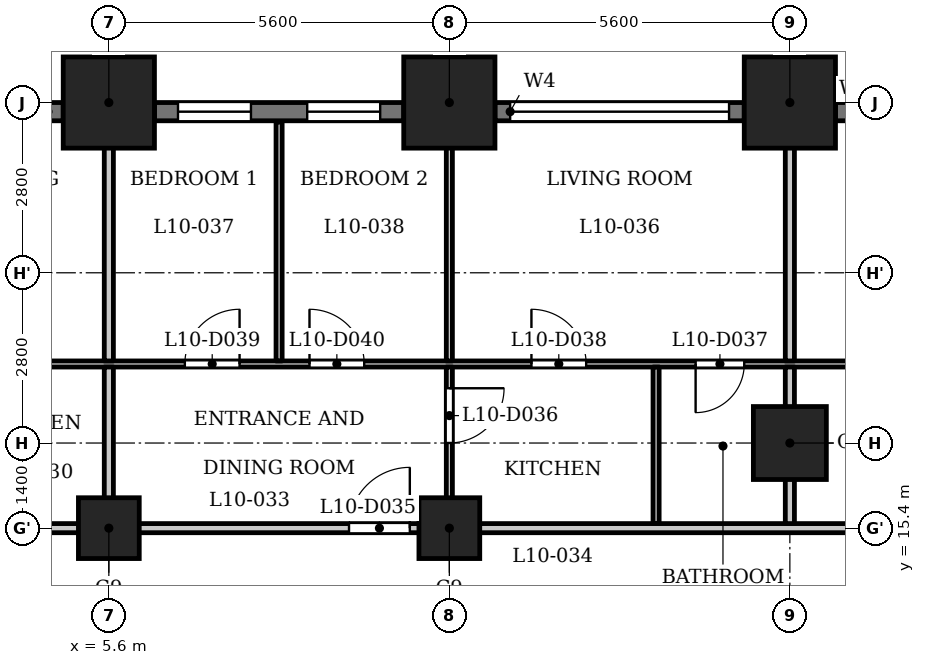
"""IFC4 building model, lengths in metres.
Left out: names, types, materials, properties, quantities, classifications, styles, units other than length and angle.
Written with IfcOpenShell. Run it as: python <this file> out.ifc"""

import sys

from ifc_helpers import new_model, si_unit, direction, frame, frame_2d, origin, origin_2d, place, context, subcontext, project, spatial, rectangle, extrude, element, fill, save


model = new_model("IFC4")
c1 = context("Model", 3, precision=1e-05, world=origin(), true_north=direction((0.0, 1.0)))
c2 = subcontext(c1, "Body", "Model", "MODEL_VIEW")
j1 = project(units=[si_unit("LENGTHUNIT", "METRE"), si_unit("PLANEANGLEUNIT", "RADIAN")], contexts=[c1])
p1 = place(None, origin())
s1 = spatial("IfcSite", under=j1, at=p1, CompositionType="ELEMENT")
p2 = place(p1, origin())
s2 = spatial("IfcBuilding", under=s1, at=p2, CompositionType="ELEMENT")
p3 = place(p2, frame((0.0, 0.0, 44.5)))
s3 = spatial("IfcBuildingStorey", under=s2, at=p3, CompositionType="ELEMENT", Elevation=44.5)
for number, where, z_axis, x_axis in (
    (1, (16.8, 22.4, 0.0), (0.0, 0.0, 1.0), (1.0, 0.0, 0.0)),
    (2, (11.2, 22.4, 0.0), (0.0, 0.0, 1.0), (1.0, 0.0, 0.0)),
    (3, (5.6, 22.4, 0.0), (0.0, 0.0, 1.0), (1.0, 0.0, 0.0)),
):
    element("IfcColumn", number, at=place(p3, frame(where, z_axis=z_axis, x_axis=x_axis)), inside=s3, PredefinedType="COLUMN", context=c2, shape_type="SweptSolid", body=[
        extrude(rectangle(XDim=1.5, YDim=1.5, at=origin_2d()), origin(), (0.0, 0.0, 1.0), 3.5),
    ])
p4 = place(p3, frame((16.8, 16.8, 0.0), z_axis=(0.0, 0.0, 1.0), x_axis=(1.0, 0.0, 0.0)))
e4 = element("IfcColumn", 4, at=p4, inside=s3, PredefinedType="COLUMN", context=c2, shape_type="SweptSolid", body=[
    extrude(rectangle(XDim=1.2, YDim=1.2, at=origin_2d()), origin(), (0.0, 0.0, 1.0), 3.5),
])
for number, where, z_axis, x_axis in (
    (5, (5.6, 15.4, 0.0), (0.0, 0.0, 1.0), (1.0, 0.0, 0.0)),
    (6, (11.2, 15.4, 0.0), (0.0, 0.0, 1.0), (1.0, 0.0, 0.0)),
):
    element("IfcColumn", number, at=place(p3, frame(where, z_axis=z_axis, x_axis=x_axis)), inside=s3, PredefinedType="COLUMN", context=c2, shape_type="SweptSolid", body=[
        extrude(rectangle(XDim=1.0, YDim=1.0, at=origin_2d()), origin(), (0.0, 0.0, 1.0), 3.5),
    ])
p5 = place(p3, frame((20.0, 22.25, 0.0), z_axis=(0.0, 0.0, 1.0), x_axis=(-1.0, 0.0, 0.0)))
e7 = element("IfcWall", 7, at=p5, inside=s3, PredefinedType="SOLIDWALL", context=c2, shape_type="SweptSolid", body=[
    extrude(rectangle(XDim=2.45, YDim=0.3, at=frame_2d((1.225, 0.0))), origin(), (0.0, 0.0, 1.0), 2.35),
])
p6 = place(p5, frame((0.325, 0.0, 0.9)))
e8 = element("IfcOpeningElement", 8, at=p6, cuts=e7, PredefinedType="OPENING", context=c2, shape_type="SweptSolid", body=[
    extrude(rectangle(XDim=1.8, YDim=1.25, at=frame_2d((0.9, 0.625))), frame((0.0, 0.16, 0.0), z_axis=(0.0, -1.0, 0.0), x_axis=(1.0, 0.0, 0.0)), (0.0, 0.0, 1.0), 0.32),
])
p7 = place(p3, frame((16.05, 22.25, 0.0), z_axis=(0.0, 0.0, 1.0), x_axis=(-1.0, 0.0, 0.0)))
e9 = element("IfcWall", 9, at=p7, inside=s3, PredefinedType="SOLIDWALL", context=c2, shape_type="SweptSolid", body=[
    extrude(rectangle(XDim=4.1, YDim=0.3, at=frame_2d((2.05, 0.0))), origin(), (0.0, 0.0, 1.0), 2.35),
])
p8 = place(p7, frame((0.25, 0.0, 1.2)))
e10 = element("IfcOpeningElement", 10, at=p8, cuts=e9, PredefinedType="OPENING", context=c2, shape_type="SweptSolid", body=[
    extrude(rectangle(XDim=3.6, YDim=0.95, at=frame_2d((1.8, 0.475))), frame((0.0, 0.16, 0.0), z_axis=(0.0, -1.0, 0.0), x_axis=(1.0, 0.0, 0.0)), (0.0, 0.0, 1.0), 0.32),
])
p9 = place(p3, frame((10.45, 22.25, 0.0), z_axis=(0.0, 0.0, 1.0), x_axis=(-1.0, 0.0, 0.0)))
e11 = element("IfcWall", 11, at=p9, inside=s3, PredefinedType="SOLIDWALL", context=c2, shape_type="SweptSolid", body=[
    extrude(rectangle(XDim=4.1, YDim=0.3, at=frame_2d((2.05, 0.0))), origin(), (0.0, 0.0, 1.0), 2.35),
])
p10 = place(p9, frame((0.387, 0.0, 0.6)))
e12 = element("IfcOpeningElement", 12, at=p10, cuts=e11, PredefinedType="OPENING", context=c2, shape_type="SweptSolid", body=[
    extrude(rectangle(XDim=1.2, YDim=1.55, at=frame_2d((0.6, 0.775))), frame((0.0, 0.16, 0.0), z_axis=(0.0, -1.0, 0.0), x_axis=(1.0, 0.0, 0.0)), (0.0, 0.0, 1.0), 0.32),
])
p11 = place(p9, frame((2.512, 0.0, 0.6)))
e13 = element("IfcOpeningElement", 13, at=p11, cuts=e11, PredefinedType="OPENING", context=c2, shape_type="SweptSolid", body=[
    extrude(rectangle(XDim=1.2, YDim=1.55, at=frame_2d((0.6, 0.775))), frame((0.0, 0.16, 0.0), z_axis=(0.0, -1.0, 0.0), x_axis=(1.0, 0.0, 0.0)), (0.0, 0.0, 1.0), 0.32),
])
p12 = place(p3, frame((4.85, 22.25, 0.0), z_axis=(0.0, 0.0, 1.0), x_axis=(-1.0, 0.0, 0.0)))
e14 = element("IfcWall", 14, at=p12, inside=s3, PredefinedType="SOLIDWALL", context=c2, shape_type="SweptSolid", body=[
    extrude(rectangle(XDim=4.1, YDim=0.3, at=frame_2d((2.05, 0.0))), origin(), (0.0, 0.0, 1.0), 2.35),
])
p13 = place(p12, frame((0.25, 0.0, 1.2)))
e15 = element("IfcOpeningElement", 15, at=p13, cuts=e14, PredefinedType="OPENING", context=c2, shape_type="SweptSolid", body=[
    extrude(rectangle(XDim=3.6, YDim=0.95, at=frame_2d((1.8, 0.475))), frame((0.0, 0.16, 0.0), z_axis=(0.0, -1.0, 0.0), x_axis=(1.0, 0.0, 0.0)), (0.0, 0.0, 1.0), 0.32),
])
p14 = place(p3, frame((-27.484, 15.4, 0.0), z_axis=(0.0, 0.0, 1.0), x_axis=(1.0, 0.0, 0.0)))
e16 = element("IfcWall", 16, at=p14, inside=s3, PredefinedType="PARTITIONING", context=c2, shape_type="SweptSolid", body=[
    extrude(rectangle(XDim=54.968, YDim=0.15, at=frame_2d((27.484, 0.0))), origin(), (0.0, 0.0, 1.0), 3.2),
])
p15 = place(p14, frame((8.784, 0.0, 0.0)))
e17 = element("IfcOpeningElement", 17, at=p15, cuts=e16, PredefinedType="OPENING", context=c2, shape_type="SweptSolid", body=[
    extrude(rectangle(XDim=1.0, YDim=2.1, at=frame_2d((0.5, 1.05))), frame((0.0, 0.085, 0.0), z_axis=(0.0, -1.0, 0.0), x_axis=(1.0, 0.0, 0.0)), (0.0, 0.0, 1.0), 0.17),
])
p16 = place(p14, frame((14.634, 0.0, 0.0)))
e18 = element("IfcOpeningElement", 18, at=p16, cuts=e16, PredefinedType="OPENING", context=c2, shape_type="SweptSolid", body=[
    extrude(rectangle(XDim=1.0, YDim=2.1, at=frame_2d((0.5, 1.05))), frame((0.0, 0.085, 0.0), z_axis=(0.0, -1.0, 0.0), x_axis=(1.0, 0.0, 0.0)), (0.0, 0.0, 1.0), 0.17),
])
p17 = place(p14, frame((25.834, 0.0, 0.0)))
e19 = element("IfcOpeningElement", 19, at=p17, cuts=e16, PredefinedType="OPENING", context=c2, shape_type="SweptSolid", body=[
    extrude(rectangle(XDim=1.0, YDim=2.1, at=frame_2d((0.5, 1.05))), frame((0.0, 0.085, 0.0), z_axis=(0.0, -1.0, 0.0), x_axis=(1.0, 0.0, 0.0)), (0.0, 0.0, 1.0), 0.17),
])
p18 = place(p14, frame((30.184, 0.0, 0.0)))
e20 = element("IfcOpeningElement", 20, at=p18, cuts=e16, PredefinedType="OPENING", context=c2, shape_type="SweptSolid", body=[
    extrude(rectangle(XDim=1.0, YDim=2.1, at=frame_2d((0.5, 1.05))), frame((0.0, 0.085, 0.0), z_axis=(0.0, -1.0, 0.0), x_axis=(1.0, 0.0, 0.0)), (0.0, 0.0, 1.0), 0.17),
])
p19 = place(p14, frame((37.034, 0.0, 0.0)))
e21 = element("IfcOpeningElement", 21, at=p19, cuts=e16, PredefinedType="OPENING", context=c2, shape_type="SweptSolid", body=[
    extrude(rectangle(XDim=1.0, YDim=2.1, at=frame_2d((0.5, 1.05))), frame((0.0, 0.085, 0.0), z_axis=(0.0, -1.0, 0.0), x_axis=(1.0, 0.0, 0.0)), (0.0, 0.0, 1.0), 0.17),
])
p20 = place(p14, frame((48.234, 0.0, 0.0)))
e22 = element("IfcOpeningElement", 22, at=p20, cuts=e16, PredefinedType="OPENING", context=c2, shape_type="SweptSolid", body=[
    extrude(rectangle(XDim=1.0, YDim=2.1, at=frame_2d((0.5, 1.05))), frame((0.0, 0.085, 0.0), z_axis=(0.0, -1.0, 0.0), x_axis=(1.0, 0.0, 0.0)), (0.0, 0.0, 1.0), 0.17),
])
p21 = place(p3, frame((-26.44, 18.1, 0.0), z_axis=(0.0, 0.0, 1.0), x_axis=(1.0, 0.0, 0.0)))
e23 = element("IfcWall", 23, at=p21, inside=s3, PredefinedType="PARTITIONING", context=c2, shape_type="SweptSolid", body=[
    extrude(rectangle(XDim=52.63, YDim=0.1, at=frame_2d((26.315, 0.0))), origin(), (0.0, 0.0, 1.0), 3.2),
])
p22 = place(p21, frame((2.626, 0.0, 0.0)))
e24 = element("IfcOpeningElement", 24, at=p22, cuts=e23, PredefinedType="OPENING", context=c2, shape_type="SweptSolid", body=[
    extrude(rectangle(XDim=0.8, YDim=2.1, at=frame_2d((0.4, 1.05))), frame((0.0, 0.06, 0.0), z_axis=(0.0, -1.0, 0.0), x_axis=(1.0, 0.0, 0.0)), (0.0, 0.0, 1.0), 0.12),
])
p23 = place(p21, frame((7.84, 0.0, 0.0)))
e25 = element("IfcOpeningElement", 25, at=p23, cuts=e23, PredefinedType="OPENING", context=c2, shape_type="SweptSolid", body=[
    extrude(rectangle(XDim=0.9, YDim=2.1, at=frame_2d((0.45, 1.05))), frame((0.0, 0.06, 0.0), z_axis=(0.0, -1.0, 0.0), x_axis=(1.0, 0.0, 0.0)), (0.0, 0.0, 1.0), 0.12),
])
p24 = place(p21, frame((18.49, 0.0, 0.0)))
e26 = element("IfcOpeningElement", 26, at=p24, cuts=e23, PredefinedType="OPENING", context=c2, shape_type="SweptSolid", body=[
    extrude(rectangle(XDim=0.8, YDim=2.1, at=frame_2d((0.4, 1.05))), frame((0.0, 0.06, 0.0), z_axis=(0.0, -1.0, 0.0), x_axis=(1.0, 0.0, 0.0)), (0.0, 0.0, 1.0), 0.12),
])
p25 = place(p21, frame((16.54, 0.0, 0.0)))
e27 = element("IfcOpeningElement", 27, at=p25, cuts=e23, PredefinedType="OPENING", context=c2, shape_type="SweptSolid", body=[
    extrude(rectangle(XDim=0.9, YDim=2.1, at=frame_2d((0.45, 1.05))), frame((0.0, 0.06, 0.0), z_axis=(0.0, -1.0, 0.0), x_axis=(1.0, 0.0, 0.0)), (0.0, 0.0, 1.0), 0.12),
])
p26 = place(p21, frame((10.89, 0.0, 0.0)))
e28 = element("IfcOpeningElement", 28, at=p26, cuts=e23, PredefinedType="OPENING", context=c2, shape_type="SweptSolid", body=[
    extrude(rectangle(XDim=0.9, YDim=2.1, at=frame_2d((0.45, 1.05))), frame((0.0, 0.06, 0.0), z_axis=(0.0, -1.0, 0.0), x_axis=(1.0, 0.0, 0.0)), (0.0, 0.0, 1.0), 0.12),
])
p27 = place(p21, frame((12.94, 0.0, 0.0)))
e29 = element("IfcOpeningElement", 29, at=p27, cuts=e23, PredefinedType="OPENING", context=c2, shape_type="SweptSolid", body=[
    extrude(rectangle(XDim=0.9, YDim=2.1, at=frame_2d((0.45, 1.05))), frame((0.0, 0.06, 0.0), z_axis=(0.0, -1.0, 0.0), x_axis=(1.0, 0.0, 0.0)), (0.0, 0.0, 1.0), 0.12),
])
p28 = place(p21, frame((21.49, 0.0, 0.0)))
e30 = element("IfcOpeningElement", 30, at=p28, cuts=e23, PredefinedType="OPENING", context=c2, shape_type="SweptSolid", body=[
    extrude(rectangle(XDim=0.8, YDim=2.1, at=frame_2d((0.4, 1.05))), frame((0.0, 0.06, 0.0), z_axis=(0.0, -1.0, 0.0), x_axis=(1.0, 0.0, 0.0)), (0.0, 0.0, 1.0), 0.12),
])
p29 = place(p21, frame((24.89, 0.0, 0.0)))
e31 = element("IfcOpeningElement", 31, at=p29, cuts=e23, PredefinedType="OPENING", context=c2, shape_type="SweptSolid", body=[
    extrude(rectangle(XDim=0.9, YDim=2.1, at=frame_2d((0.45, 1.05))), frame((0.0, 0.06, 0.0), z_axis=(0.0, -1.0, 0.0), x_axis=(1.0, 0.0, 0.0)), (0.0, 0.0, 1.0), 0.12),
])
p30 = place(p21, frame((27.09, 0.0, 0.0)))
e32 = element("IfcOpeningElement", 32, at=p30, cuts=e23, PredefinedType="OPENING", context=c2, shape_type="SweptSolid", body=[
    extrude(rectangle(XDim=0.8, YDim=2.1, at=frame_2d((0.4, 1.05))), frame((0.0, 0.06, 0.0), z_axis=(0.0, -1.0, 0.0), x_axis=(1.0, 0.0, 0.0)), (0.0, 0.0, 1.0), 0.12),
])
p31 = place(p21, frame((28.99, 0.0, 0.0)))
e33 = element("IfcOpeningElement", 33, at=p31, cuts=e23, PredefinedType="OPENING", context=c2, shape_type="SweptSolid", body=[
    extrude(rectangle(XDim=0.9, YDim=2.1, at=frame_2d((0.45, 1.05))), frame((0.0, 0.06, 0.0), z_axis=(0.0, -1.0, 0.0), x_axis=(1.0, 0.0, 0.0)), (0.0, 0.0, 1.0), 0.12),
])
p32 = place(p21, frame((41.69, 0.0, 0.0)))
e34 = element("IfcOpeningElement", 34, at=p32, cuts=e23, PredefinedType="OPENING", context=c2, shape_type="SweptSolid", body=[
    extrude(rectangle(XDim=0.8, YDim=2.1, at=frame_2d((0.4, 1.05))), frame((0.0, 0.06, 0.0), z_axis=(0.0, -1.0, 0.0), x_axis=(1.0, 0.0, 0.0)), (0.0, 0.0, 1.0), 0.12),
])
p33 = place(p21, frame((38.99, 0.0, 0.0)))
e35 = element("IfcOpeningElement", 35, at=p33, cuts=e23, PredefinedType="OPENING", context=c2, shape_type="SweptSolid", body=[
    extrude(rectangle(XDim=0.9, YDim=2.1, at=frame_2d((0.45, 1.05))), frame((0.0, 0.06, 0.0), z_axis=(0.0, -1.0, 0.0), x_axis=(1.0, 0.0, 0.0)), (0.0, 0.0, 1.0), 0.12),
])
p34 = place(p21, frame((33.29, 0.0, 0.0)))
e36 = element("IfcOpeningElement", 36, at=p34, cuts=e23, PredefinedType="OPENING", context=c2, shape_type="SweptSolid", body=[
    extrude(rectangle(XDim=0.9, YDim=2.1, at=frame_2d((0.45, 1.05))), frame((0.0, 0.06, 0.0), z_axis=(0.0, -1.0, 0.0), x_axis=(1.0, 0.0, 0.0)), (0.0, 0.0, 1.0), 0.12),
])
p35 = place(p21, frame((35.34, 0.0, 0.0)))
e37 = element("IfcOpeningElement", 37, at=p35, cuts=e23, PredefinedType="OPENING", context=c2, shape_type="SweptSolid", body=[
    extrude(rectangle(XDim=0.9, YDim=2.1, at=frame_2d((0.45, 1.05))), frame((0.0, 0.06, 0.0), z_axis=(0.0, -1.0, 0.0), x_axis=(1.0, 0.0, 0.0)), (0.0, 0.0, 1.0), 0.12),
])
p36 = place(p21, frame((50.74, 0.0, 0.0)))
e38 = element("IfcOpeningElement", 38, at=p36, cuts=e23, PredefinedType="OPENING", context=c2, shape_type="SweptSolid", body=[
    extrude(rectangle(XDim=0.8, YDim=2.1, at=frame_2d((0.4, 1.05))), frame((0.0, 0.06, 0.0), z_axis=(0.0, -1.0, 0.0), x_axis=(1.0, 0.0, 0.0)), (0.0, 0.0, 1.0), 0.12),
])
p37 = place(p21, frame((47.29, 0.0, 0.0)))
e39 = element("IfcOpeningElement", 39, at=p37, cuts=e23, PredefinedType="OPENING", context=c2, shape_type="SweptSolid", body=[
    extrude(rectangle(XDim=0.9, YDim=2.1, at=frame_2d((0.45, 1.05))), frame((0.0, 0.06, 0.0), z_axis=(0.0, -1.0, 0.0), x_axis=(1.0, 0.0, 0.0)), (0.0, 0.0, 1.0), 0.12),
])
p38 = place(p3, frame((5.6, 15.475, 0.0), z_axis=(0.0, 0.0, 1.0), x_axis=(0.0, 1.0, 0.0)))
e40 = element("IfcWall", 40, at=p38, inside=s3, PredefinedType="PARTITIONING", context=c2, shape_type="SweptSolid", body=[
    extrude(rectangle(XDim=2.575, YDim=0.15, at=frame_2d((1.288, 0.0))), origin(), (0.0, 0.0, 1.0), 3.2),
])
p39 = place(p3, frame((5.6, 18.15, 0.0), z_axis=(0.0, 0.0, 1.0), x_axis=(0.0, 1.0, 0.0)))
e41 = element("IfcWall", 41, at=p39, inside=s3, PredefinedType="PARTITIONING", context=c2, shape_type="SweptSolid", body=[
    extrude(rectangle(XDim=4.98, YDim=0.15, at=frame_2d((2.49, 0.0))), origin(), (0.0, 0.0, 1.0), 3.2),
])
p40 = place(p3, frame((8.4, 18.15, 0.0), z_axis=(0.0, 0.0, 1.0), x_axis=(0.0, 1.0, 0.0)))
e42 = element("IfcWall", 42, at=p40, inside=s3, PredefinedType="PARTITIONING", context=c2, shape_type="SweptSolid", body=[
    extrude(rectangle(XDim=3.93, YDim=0.1, at=frame_2d((1.965, 0.0))), origin(), (0.0, 0.0, 1.0), 3.2),
])
p41 = place(p3, frame((11.2, 15.475, 0.0), z_axis=(0.0, 0.0, 1.0), x_axis=(0.0, 1.0, 0.0)))
e43 = element("IfcWall", 43, at=p41, inside=s3, PredefinedType="PARTITIONING", context=c2, shape_type="SweptSolid", body=[
    extrude(rectangle(XDim=2.575, YDim=0.1, at=frame_2d((1.288, 0.0))), origin(), (0.0, 0.0, 1.0), 3.2),
])
p42 = place(p41, frame((1.326, 0.0, 0.0)))
e44 = element("IfcOpeningElement", 44, at=p42, cuts=e43, PredefinedType="OPENING", context=c2, shape_type="SweptSolid", body=[
    extrude(rectangle(XDim=0.9, YDim=2.1, at=frame_2d((0.45, 1.05))), frame((0.0, 0.06, 0.0), z_axis=(0.0, -1.0, 0.0), x_axis=(1.0, 0.0, 0.0)), (0.0, 0.0, 1.0), 0.12),
])
p43 = place(p3, frame((11.2, 18.15, 0.0), z_axis=(0.0, 0.0, 1.0), x_axis=(0.0, 1.0, 0.0)))
e45 = element("IfcWall", 45, at=p43, inside=s3, PredefinedType="PARTITIONING", context=c2, shape_type="SweptSolid", body=[
    extrude(rectangle(XDim=4.98, YDim=0.1, at=frame_2d((2.49, 0.0))), origin(), (0.0, 0.0, 1.0), 3.2),
])
p44 = place(p3, frame((14.6, 15.475, 0.0), z_axis=(0.0, 0.0, 1.0), x_axis=(0.0, 1.0, 0.0)))
e46 = element("IfcWall", 46, at=p44, inside=s3, PredefinedType="PARTITIONING", context=c2, shape_type="SweptSolid", body=[
    extrude(rectangle(XDim=2.575, YDim=0.1, at=frame_2d((1.288, 0.0))), origin(), (0.0, 0.0, 1.0), 3.2),
])
p45 = place(p3, frame((16.8, 15.475, 0.0), z_axis=(0.0, 0.0, 1.0), x_axis=(0.0, 1.0, 0.0)))
e47 = element("IfcWall", 47, at=p45, inside=s3, PredefinedType="PARTITIONING", context=c2, shape_type="SweptSolid", body=[
    extrude(rectangle(XDim=2.575, YDim=0.15, at=frame_2d((1.288, 0.0))), origin(), (0.0, 0.0, 1.0), 3.2),
])
p46 = place(p3, frame((16.8, 18.15, 0.0), z_axis=(0.0, 0.0, 1.0), x_axis=(0.0, 1.0, 0.0)))
e48 = element("IfcWall", 48, at=p46, inside=s3, PredefinedType="PARTITIONING", context=c2, shape_type="SweptSolid", body=[
    extrude(rectangle(XDim=4.98, YDim=0.15, at=frame_2d((2.49, 0.0))), origin(), (0.0, 0.0, 1.0), 3.2),
])
p47 = place(p19, origin())
e49 = element("IfcDoor", 49, at=p47, inside=s3, OperationType="SINGLE_SWING_LEFT", PredefinedType="DOOR", context=c2, shape_type="SweptSolid", body=[
    extrude(rectangle(XDim=1.0, YDim=2.1, at=frame_2d((0.5, 1.05))), frame((0.0, 0.025, 0.0), z_axis=(0.0, -1.0, 0.0), x_axis=(1.0, 0.0, 0.0)), (0.0, 0.0, 1.0), 0.05),
])
fill(e21, e49)
p48 = place(p42, origin())
e50 = element("IfcDoor", 50, at=p48, inside=s3, OperationType="SINGLE_SWING_RIGHT", PredefinedType="DOOR", context=c2, shape_type="SweptSolid", body=[
    extrude(rectangle(XDim=0.9, YDim=2.1, at=frame_2d((0.45, 1.05))), frame((0.0, 0.025, 0.0), z_axis=(0.0, -1.0, 0.0), x_axis=(1.0, 0.0, 0.0)), (0.0, 0.0, 1.0), 0.05),
])
fill(e44, e50)
p49 = place(p32, origin())
e51 = element("IfcDoor", 51, at=p49, inside=s3, OperationType="SINGLE_SWING_LEFT", PredefinedType="DOOR", context=c2, shape_type="SweptSolid", body=[
    extrude(rectangle(XDim=0.8, YDim=2.1, at=frame_2d((0.4, 1.05))), frame((0.0, 0.025, 0.0), z_axis=(0.0, -1.0, 0.0), x_axis=(1.0, 0.0, 0.0)), (0.0, 0.0, 1.0), 0.05),
])
fill(e34, e51)
p50 = place(p33, origin())
e52 = element("IfcDoor", 52, at=p50, inside=s3, OperationType="SINGLE_SWING_RIGHT", PredefinedType="DOOR", context=c2, shape_type="SweptSolid", body=[
    extrude(rectangle(XDim=0.9, YDim=2.1, at=frame_2d((0.45, 1.05))), frame((0.0, 0.025, 0.0), z_axis=(0.0, -1.0, 0.0), x_axis=(1.0, 0.0, 0.0)), (0.0, 0.0, 1.0), 0.05),
])
fill(e35, e52)
p51 = place(p34, origin())
e53 = element("IfcDoor", 53, at=p51, inside=s3, OperationType="SINGLE_SWING_LEFT", PredefinedType="DOOR", context=c2, shape_type="SweptSolid", body=[
    extrude(rectangle(XDim=0.9, YDim=2.1, at=frame_2d((0.45, 1.05))), frame((0.0, 0.025, 0.0), z_axis=(0.0, -1.0, 0.0), x_axis=(1.0, 0.0, 0.0)), (0.0, 0.0, 1.0), 0.05),
])
fill(e36, e53)
p52 = place(p35, origin())
e54 = element("IfcDoor", 54, at=p52, inside=s3, OperationType="SINGLE_SWING_RIGHT", PredefinedType="DOOR", context=c2, shape_type="SweptSolid", body=[
    extrude(rectangle(XDim=0.9, YDim=2.1, at=frame_2d((0.45, 1.05))), frame((0.0, 0.025, 0.0), z_axis=(0.0, -1.0, 0.0), x_axis=(1.0, 0.0, 0.0)), (0.0, 0.0, 1.0), 0.05),
])
fill(e37, e54)
p53 = place(p8, origin())
e55 = element("IfcWindow", 55, at=p53, inside=s3, PartitioningType="SINGLE_PANEL", PredefinedType="WINDOW", context=c2, shape_type="SweptSolid", body=[
    extrude(rectangle(XDim=3.6, YDim=0.95, at=frame_2d((1.8, 0.475))), frame((0.0, 0.03, 0.0), z_axis=(0.0, -1.0, 0.0), x_axis=(1.0, 0.0, 0.0)), (0.0, 0.0, 1.0), 0.06),
])
fill(e10, e55)
p54 = place(p10, origin())
e56 = element("IfcWindow", 56, at=p54, inside=s3, PartitioningType="SINGLE_PANEL", PredefinedType="WINDOW", context=c2, shape_type="SweptSolid", body=[
    extrude(rectangle(XDim=1.2, YDim=1.55, at=frame_2d((0.6, 0.775))), frame((0.0, 0.03, 0.0), z_axis=(0.0, -1.0, 0.0), x_axis=(1.0, 0.0, 0.0)), (0.0, 0.0, 1.0), 0.06),
])
fill(e12, e56)
p55 = place(p11, origin())
e57 = element("IfcWindow", 57, at=p55, inside=s3, PartitioningType="SINGLE_PANEL", PredefinedType="WINDOW", context=c2, shape_type="SweptSolid", body=[
    extrude(rectangle(XDim=1.2, YDim=1.55, at=frame_2d((0.6, 0.775))), frame((0.0, 0.03, 0.0), z_axis=(0.0, -1.0, 0.0), x_axis=(1.0, 0.0, 0.0)), (0.0, 0.0, 1.0), 0.06),
])
fill(e13, e57)
save(model, sys.argv[1])
